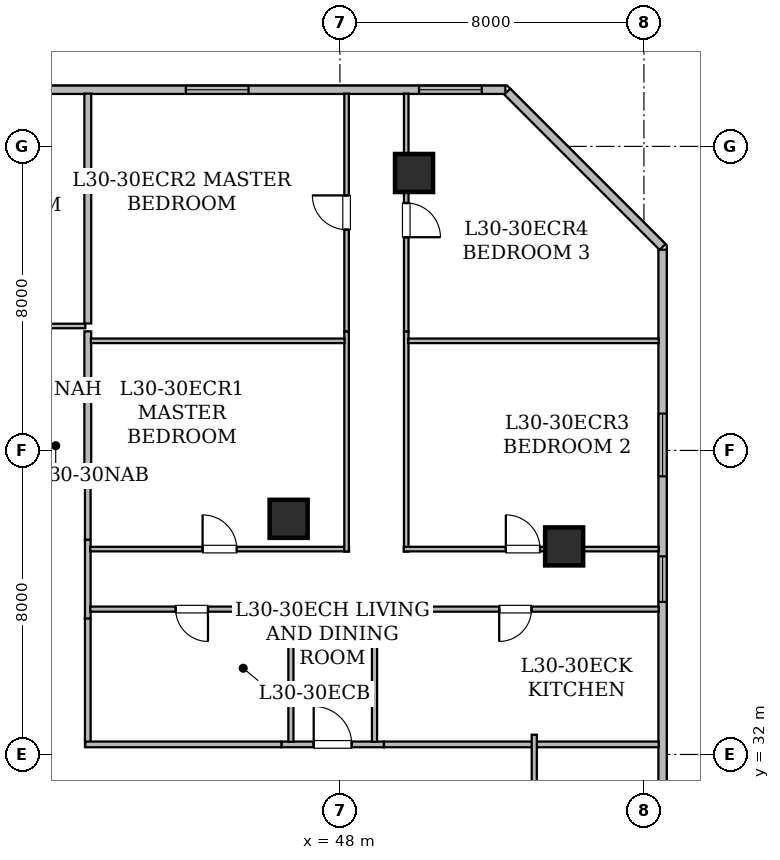
"""IFC4 building model, lengths in metres.
Left out: names, types, materials, properties, quantities, classifications, styles, units other than length and angle.
Written with IfcOpenShell. Run it as: python <this file> out.ifc"""

import sys

from ifc_helpers import new_model, si_unit, direction, frame, frame_2d, origin, origin_2d, place, context, subcontext, project, spatial, rectangle, hollow_rectangle, extrude, element, fill, save


model = new_model("IFC4")
c1 = context("Model", 3, precision=1e-05, world=origin(), true_north=direction((0.0, 1.0)))
c2 = subcontext(c1, "Body", "Model", "MODEL_VIEW")
j1 = project(units=[si_unit("LENGTHUNIT", "METRE"), si_unit("PLANEANGLEUNIT", "RADIAN")], contexts=[c1])
p1 = place(None, origin())
s1 = spatial("IfcSite", under=j1, at=p1, CompositionType="ELEMENT")
p2 = place(p1, origin())
s2 = spatial("IfcBuilding", under=s1, at=p2, CompositionType="ELEMENT")
p3 = place(p2, frame((0.0, 0.0, 120.15)))
s3 = spatial("IfcBuildingStorey", under=s2, at=p3, CompositionType="ELEMENT", Elevation=120.15)
for number, where, z_axis, x_axis in (
    (1, (49.95, 47.3, 0.0), (0.0, 0.0, 1.0), (1.0, 0.0, 0.0)),
    (2, (53.9, 37.475, 0.0), (0.0, 0.0, 1.0), (1.0, 0.0, 0.0)),
    (3, (46.65, 38.2, 0.0), (0.0, 0.0, 1.0), (1.0, 0.0, 0.0)),
):
    element("IfcColumn", number, at=place(p3, frame(where, z_axis=z_axis, x_axis=x_axis)), inside=s3, PredefinedType="COLUMN", context=c2, shape_type="SweptSolid", body=[
        extrude(hollow_rectangle(XDim=1.0, YDim=1.0, WallThickness=0.05, at=origin_2d()), origin(), (0.0, 0.0, 1.0), 3.65),
    ])
p4 = place(p3, frame((13.715, 49.49, 0.0), z_axis=(0.0, 0.0, 1.0), x_axis=(1.0, 0.0, 0.0)))
e4 = element("IfcWall", 4, at=p4, inside=s3, PredefinedType="STANDARD", context=c2, shape_type="SweptSolid", body=[
    extrude(rectangle(XDim=38.639, YDim=0.22, at=frame_2d((19.319, 0.0))), origin(), (0.0, 0.0, 1.0), 3.43),
])
p5 = place(p4, frame((16.16, 0.0, 0.85)))
e5 = element("IfcOpeningElement", 5, at=p5, cuts=e4, PredefinedType="OPENING", context=c2, shape_type="SweptSolid", body=[
    extrude(rectangle(XDim=1.65, YDim=1.55, at=frame_2d((0.825, 0.775))), frame((0.0, 0.12, 0.0), z_axis=(0.0, -1.0, 0.0), x_axis=(1.0, 0.0, 0.0)), (0.0, 0.0, 1.0), 0.24),
])
p6 = place(p4, frame((2.243, 0.0, 0.85)))
e6 = element("IfcOpeningElement", 6, at=p6, cuts=e4, PredefinedType="OPENING", context=c2, shape_type="SweptSolid", body=[
    extrude(rectangle(XDim=1.65, YDim=1.55, at=frame_2d((0.825, 0.775))), frame((0.0, 0.12, 0.0), z_axis=(0.0, -1.0, 0.0), x_axis=(1.0, 0.0, 0.0)), (0.0, 0.0, 1.0), 0.24),
])
p7 = place(p4, frame((11.03, 0.0, 0.85)))
e7 = element("IfcOpeningElement", 7, at=p7, cuts=e4, PredefinedType="OPENING", context=c2, shape_type="SweptSolid", body=[
    extrude(rectangle(XDim=1.65, YDim=1.55, at=frame_2d((0.825, 0.775))), frame((0.0, 0.12, 0.0), z_axis=(0.0, -1.0, 0.0), x_axis=(1.0, 0.0, 0.0)), (0.0, 0.0, 1.0), 0.24),
])
p8 = place(p4, frame((9.2, 0.0, 0.8)))
e8 = element("IfcOpeningElement", 8, at=p8, cuts=e4, PredefinedType="OPENING", context=c2, shape_type="SweptSolid", body=[
    extrude(rectangle(XDim=1.2, YDim=1.5, at=frame_2d((0.6, 0.75))), frame((0.0, 0.12, 0.0), z_axis=(0.0, -1.0, 0.0), x_axis=(1.0, 0.0, 0.0)), (0.0, 0.0, 1.0), 0.24),
])
p9 = place(p4, frame((6.175, 0.0, 0.85)))
e9 = element("IfcOpeningElement", 9, at=p9, cuts=e4, PredefinedType="OPENING", context=c2, shape_type="SweptSolid", body=[
    extrude(rectangle(XDim=1.65, YDim=1.55, at=frame_2d((0.825, 0.775))), frame((0.0, 0.12, 0.0), z_axis=(0.0, -1.0, 0.0), x_axis=(1.0, 0.0, 0.0)), (0.0, 0.0, 1.0), 0.24),
])
p10 = place(p4, frame((23.425, 0.0, 0.85)))
e10 = element("IfcOpeningElement", 10, at=p10, cuts=e4, PredefinedType="OPENING", context=c2, shape_type="SweptSolid", body=[
    extrude(rectangle(XDim=1.65, YDim=1.55, at=frame_2d((0.825, 0.775))), frame((0.0, 0.12, 0.0), z_axis=(0.0, -1.0, 0.0), x_axis=(1.0, 0.0, 0.0)), (0.0, 0.0, 1.0), 0.24),
])
p11 = place(p4, frame((30.23, 0.0, 0.85)))
e11 = element("IfcOpeningElement", 11, at=p11, cuts=e4, PredefinedType="OPENING", context=c2, shape_type="SweptSolid", body=[
    extrude(rectangle(XDim=1.65, YDim=1.55, at=frame_2d((0.825, 0.775))), frame((0.0, 0.12, 0.0), z_axis=(0.0, -1.0, 0.0), x_axis=(1.0, 0.0, 0.0)), (0.0, 0.0, 1.0), 0.24),
])
p12 = place(p4, frame((36.367, 0.0, 0.85)))
e12 = element("IfcOpeningElement", 12, at=p12, cuts=e4, PredefinedType="OPENING", context=c2, shape_type="SweptSolid", body=[
    extrude(rectangle(XDim=1.65, YDim=1.55, at=frame_2d((0.825, 0.775))), frame((0.0, 0.12, 0.0), z_axis=(0.0, -1.0, 0.0), x_axis=(1.0, 0.0, 0.0)), (0.0, 0.0, 1.0), 0.24),
])
p13 = place(p3, frame((52.402, 49.442, 0.0), z_axis=(0.0, 0.0, 1.0), x_axis=(0.707106781187, -0.707106781187, 0.0)))
e13 = element("IfcWall", 13, at=p13, inside=s3, PredefinedType="STANDARD", context=c2, shape_type="SweptSolid", body=[
    extrude(rectangle(XDim=5.781, YDim=0.22, at=frame_2d((2.891, 0.0))), origin(), (0.0, 0.0, 1.0), 3.43),
])
p14 = place(p3, frame((56.49, 45.283, 0.0), z_axis=(0.0, 0.0, 1.0), x_axis=(0.0, -1.0, 0.0)))
e14 = element("IfcWall", 14, at=p14, inside=s3, PredefinedType="STANDARD", context=c2, shape_type="SweptSolid", body=[
    extrude(rectangle(XDim=14.046, YDim=0.22, at=frame_2d((7.023, 0.0))), origin(), (0.0, 0.0, 1.0), 3.43),
])
p15 = place(p14, frame((8.069, 0.0, 0.8)))
e15 = element("IfcOpeningElement", 15, at=p15, cuts=e14, PredefinedType="OPENING", context=c2, shape_type="SweptSolid", body=[
    extrude(rectangle(XDim=1.2, YDim=1.5, at=frame_2d((0.6, 0.75))), frame((0.0, 0.12, 0.0), z_axis=(0.0, -1.0, 0.0), x_axis=(1.0, 0.0, 0.0)), (0.0, 0.0, 1.0), 0.24),
])
p16 = place(p14, frame((4.314, 0.0, 0.85)))
e16 = element("IfcOpeningElement", 16, at=p16, cuts=e14, PredefinedType="OPENING", context=c2, shape_type="SweptSolid", body=[
    extrude(rectangle(XDim=1.65, YDim=1.55, at=frame_2d((0.825, 0.775))), frame((0.0, 0.12, 0.0), z_axis=(0.0, -1.0, 0.0), x_axis=(1.0, 0.0, 0.0)), (0.0, 0.0, 1.0), 0.24),
])
p17 = place(p3, frame((39.314, 39.165, 0.0), z_axis=(0.0, 0.0, 1.0), x_axis=(1.0, 0.0, 0.0)))
e17 = element("IfcWall", 17, at=p17, inside=s3, PredefinedType="STANDARD", context=c2, shape_type="SweptSolid", body=[
    extrude(rectangle(XDim=1.986, YDim=0.15, at=frame_2d((0.993, 0.0))), origin(), (0.0, 0.0, 1.0), 2.647),
])
p18 = place(p3, frame((41.365, 37.653, 0.0), z_axis=(0.0, 0.0, 1.0), x_axis=(0.0, -1.0, 0.0)))
e18 = element("IfcWall", 18, at=p18, inside=s3, PredefinedType="STANDARD", context=c2, shape_type="SweptSolid", body=[
    extrude(rectangle(XDim=2.078, YDim=0.15, at=frame_2d((1.039, 0.0))), origin(), (0.0, 0.0, 1.0), 2.647),
])
p19 = place(p3, frame((46.461, 32.265, 0.0), z_axis=(0.0, 0.0, 1.0), x_axis=(1.0, 0.0, 0.0)))
e19 = element("IfcWall", 19, at=p19, inside=s3, PredefinedType="STANDARD", context=c2, shape_type="SweptSolid", body=[
    extrude(rectangle(XDim=2.698, YDim=0.15, at=frame_2d((1.349, 0.0))), origin(), (0.0, 0.0, 1.0), 2.647),
])
p20 = place(p19, frame((0.849, 0.0, 0.0)))
e20 = element("IfcOpeningElement", 20, at=p20, cuts=e19, PredefinedType="OPENING", context=c2, shape_type="SweptSolid", body=[
    extrude(rectangle(XDim=1.0, YDim=2.15, at=frame_2d((0.5, 1.075))), frame((0.0, 0.085, 0.0), z_axis=(0.0, -1.0, 0.0), x_axis=(1.0, 0.0, 0.0)), (0.0, 0.0, 1.0), 0.17),
])
p21 = place(p3, frame((41.365, 35.575, 0.0), z_axis=(0.0, 0.0, 1.0), x_axis=(0.0, -1.0, 0.0)))
e21 = element("IfcWall", 21, at=p21, inside=s3, PredefinedType="STANDARD", context=c2, shape_type="SweptSolid", body=[
    extrude(rectangle(XDim=3.375, YDim=0.15, at=frame_2d((1.688, 0.0))), origin(), (0.0, 0.0, 1.0), 3.43),
])
p22 = place(p3, frame((41.3, 32.265, 0.0), z_axis=(0.0, 0.0, 1.0), x_axis=(1.0, 0.0, 0.0)))
e22 = element("IfcWall", 22, at=p22, inside=s3, PredefinedType="STANDARD", context=c2, shape_type="SweptSolid", body=[
    extrude(rectangle(XDim=5.161, YDim=0.15, at=frame_2d((2.581, 0.0))), origin(), (0.0, 0.0, 1.0), 2.647),
])
p23 = place(p3, frame((49.159, 32.265, 0.0), z_axis=(0.0, 0.0, 1.0), x_axis=(1.0, 0.0, 0.0)))
e23 = element("IfcWall", 23, at=p23, inside=s3, PredefinedType="STANDARD", context=c2, shape_type="SweptSolid", body=[
    extrude(rectangle(XDim=7.229, YDim=0.15, at=frame_2d((3.615, 0.0))), origin(), (0.0, 0.0, 1.0), 2.876),
])
p24 = place(p3, frame((41.365, 39.1, 0.0), z_axis=(0.0, 0.0, 1.0), x_axis=(0.0, -1.0, 0.0)))
e24 = element("IfcWall", 24, at=p24, inside=s3, PredefinedType="STANDARD", context=c2, shape_type="SweptSolid", body=[
    extrude(rectangle(XDim=1.447, YDim=0.15, at=frame_2d((0.724, 0.0))), origin(), (0.0, 0.0, 1.0), 3.43),
])
p25 = place(p3, frame((41.3, 41.695, 0.0), z_axis=(0.0, 0.0, 1.0), x_axis=(-1.0, 0.0, 0.0)))
e25 = element("IfcWall", 25, at=p25, inside=s3, PredefinedType="PARTITIONING", context=c2, shape_type="SweptSolid", body=[
    extrude(rectangle(XDim=2.3, YDim=0.135, at=frame_2d((1.15, 0.0))), origin(), (0.0, 0.0, 1.0), 2.647),
])
p26 = place(p3, frame((34.619, 43.275, 0.0), z_axis=(0.0, 0.0, 1.0), x_axis=(1.0, 0.0, 0.0)))
e26 = element("IfcWall", 26, at=p26, inside=s3, PredefinedType="PARTITIONING", context=c2, shape_type="SweptSolid", body=[
    extrude(rectangle(XDim=6.681, YDim=0.12, at=frame_2d((3.341, 0.0))), origin(), (0.0, 0.0, 1.0), 2.647),
])
p27 = place(p26, frame((2.89, 0.0, 0.0)))
e27 = element("IfcOpeningElement", 27, at=p27, cuts=e26, PredefinedType="OPENING", context=c2, shape_type="SweptSolid", body=[
    extrude(rectangle(XDim=0.9, YDim=2.1, at=frame_2d((0.45, 1.05))), frame((0.0, 0.07, 0.0), z_axis=(0.0, -1.0, 0.0), x_axis=(1.0, 0.0, 0.0)), (0.0, 0.0, 1.0), 0.14),
])
p28 = place(p3, frame((41.365, 43.133, 0.0), z_axis=(0.0, 0.0, 1.0), x_axis=(0.0, -1.0, 0.0)))
e28 = element("IfcWall", 28, at=p28, inside=s3, PredefinedType="STANDARD", context=c2, shape_type="SweptSolid", body=[
    extrude(rectangle(XDim=1.373, YDim=0.18, at=frame_2d((0.687, 0.0))), origin(), (0.0, 0.0, 1.0), 3.43),
])
p29 = place(p3, frame((41.365, 41.63, 0.0), z_axis=(0.0, 0.0, 1.0), x_axis=(0.0, -1.0, 0.0)))
e29 = element("IfcWall", 29, at=p29, inside=s3, PredefinedType="STANDARD", context=c2, shape_type="SweptSolid", body=[
    extrude(rectangle(XDim=2.4, YDim=0.18, at=frame_2d((1.2, 0.0))), origin(), (0.0, 0.0, 1.0), 3.43),
])
p30 = place(p3, frame((41.365, 49.388, 0.0), z_axis=(0.0, 0.0, 1.0), x_axis=(0.0, -1.0, 0.0)))
e30 = element("IfcWall", 30, at=p30, inside=s3, PredefinedType="STANDARD", context=c2, shape_type="SweptSolid", body=[
    extrude(rectangle(XDim=6.048, YDim=0.18, at=frame_2d((3.024, 0.0))), origin(), (0.0, 0.0, 1.0), 2.876),
])
p31 = place(p3, frame((53.114, 32.52, 0.0), z_axis=(0.0, 0.0, 1.0), x_axis=(0.0, -1.0, 0.0)))
e31 = element("IfcWall", 31, at=p31, inside=s3, PredefinedType="PARTITIONING", context=c2, shape_type="SweptSolid", body=[
    extrude(rectangle(XDim=8.78, YDim=0.135, at=frame_2d((4.39, 0.0))), origin(), (0.0, 0.0, 1.0), 3.43),
])
p32 = place(p3, frame((46.71, 32.332, 0.0), z_axis=(0.0, 0.0, 1.0), x_axis=(0.0, 1.0, 0.0)))
e32 = element("IfcWall", 32, at=p32, inside=s3, PredefinedType="PARTITIONING", context=c2, shape_type="SweptSolid", body=[
    extrude(rectangle(XDim=3.557, YDim=0.135, at=frame_2d((1.778, 0.0))), origin(), (0.0, 0.0, 1.0), 2.647),
])
p33 = place(p3, frame((46.775, 35.824, 0.0), z_axis=(0.0, 0.0, 1.0), x_axis=(-1.0, 0.0, 0.0)))
e33 = element("IfcWall", 33, at=p33, inside=s3, PredefinedType="PARTITIONING", context=c2, shape_type="SweptSolid", body=[
    extrude(rectangle(XDim=5.343, YDim=0.135, at=frame_2d((2.671, 0.0))), origin(), (0.0, 0.0, 1.0), 2.647),
])
p34 = place(p33, frame((2.247, 0.0, 0.0)))
e34 = element("IfcOpeningElement", 34, at=p34, cuts=e33, PredefinedType="OPENING", context=c2, shape_type="SweptSolid", body=[
    extrude(rectangle(XDim=0.85, YDim=2.1, at=frame_2d((0.425, 1.05))), frame((0.0, 0.077, 0.0), z_axis=(0.0, -1.0, 0.0), x_axis=(1.0, 0.0, 0.0)), (0.0, 0.0, 1.0), 0.155),
])
p35 = place(p3, frame((56.388, 35.824, 0.0), z_axis=(0.0, 0.0, 1.0), x_axis=(-1.0, 0.0, 0.0)))
e35 = element("IfcWall", 35, at=p35, inside=s3, PredefinedType="PARTITIONING", context=c2, shape_type="SweptSolid", body=[
    extrude(rectangle(XDim=7.543, YDim=0.135, at=frame_2d((3.771, 0.0))), origin(), (0.0, 0.0, 1.0), 2.876),
])
p36 = place(p35, frame((3.347, 0.0, 0.0)))
e36 = element("IfcOpeningElement", 36, at=p36, cuts=e35, PredefinedType="OPENING", context=c2, shape_type="SweptSolid", body=[
    extrude(rectangle(XDim=0.85, YDim=2.1, at=frame_2d((0.425, 1.05))), frame((0.0, 0.077, 0.0), z_axis=(0.0, -1.0, 0.0), x_axis=(1.0, 0.0, 0.0)), (0.0, 0.0, 1.0), 0.155),
])
p37 = place(p3, frame((48.91, 35.889, 0.0), z_axis=(0.0, 0.0, 1.0), x_axis=(0.0, -1.0, 0.0)))
e37 = element("IfcWall", 37, at=p37, inside=s3, PredefinedType="PARTITIONING", context=c2, shape_type="SweptSolid", body=[
    extrude(rectangle(XDim=3.557, YDim=0.135, at=frame_2d((1.778, 0.0))), origin(), (0.0, 0.0, 1.0), 3.43),
])
p38 = place(p3, frame((41.432, 37.404, 0.0), z_axis=(0.0, 0.0, 1.0), x_axis=(1.0, 0.0, 0.0)))
e38 = element("IfcWall", 38, at=p38, inside=s3, PredefinedType="PARTITIONING", context=c2, shape_type="SweptSolid", body=[
    extrude(rectangle(XDim=6.808, YDim=0.12, at=frame_2d((3.404, 0.0))), origin(), (0.0, 0.0, 1.0), 2.647),
])
p39 = place(p38, frame((2.954, 0.0, 0.0)))
e39 = element("IfcOpeningElement", 39, at=p39, cuts=e38, PredefinedType="OPENING", context=c2, shape_type="SweptSolid", body=[
    extrude(rectangle(XDim=0.9, YDim=2.1, at=frame_2d((0.45, 1.05))), frame((0.0, 0.07, 0.0), z_axis=(0.0, -1.0, 0.0), x_axis=(1.0, 0.0, 0.0)), (0.0, 0.0, 1.0), 0.14),
])
p40 = place(p3, frame((48.175, 37.339, 0.0), z_axis=(0.0, 0.0, 1.0), x_axis=(0.0, 1.0, 0.0)))
e40 = element("IfcWall", 40, at=p40, inside=s3, PredefinedType="PARTITIONING", context=c2, shape_type="SweptSolid", body=[
    extrude(rectangle(XDim=5.794, YDim=0.12, at=frame_2d((2.897, 0.0))), origin(), (0.0, 0.0, 1.0), 2.647),
])
p41 = place(p3, frame((48.175, 43.133, 0.0), z_axis=(0.0, 0.0, 1.0), x_axis=(0.0, 1.0, 0.0)))
e41 = element("IfcWall", 41, at=p41, inside=s3, PredefinedType="PARTITIONING", context=c2, shape_type="SweptSolid", body=[
    extrude(rectangle(XDim=6.255, YDim=0.12, at=frame_2d((3.127, 0.0))), origin(), (0.0, 0.0, 1.0), 2.647),
])
p42 = place(p41, frame((2.677, 0.0, 0.0)))
e42 = element("IfcOpeningElement", 42, at=p42, cuts=e41, PredefinedType="OPENING", context=c2, shape_type="SweptSolid", body=[
    extrude(rectangle(XDim=0.9, YDim=2.1, at=frame_2d((0.45, 1.05))), frame((0.0, 0.07, 0.0), z_axis=(0.0, -1.0, 0.0), x_axis=(1.0, 0.0, 0.0)), (0.0, 0.0, 1.0), 0.14),
])
p43 = place(p3, frame((49.745, 43.133, 0.0), z_axis=(0.0, 0.0, 1.0), x_axis=(0.0, -1.0, 0.0)))
e43 = element("IfcWall", 43, at=p43, inside=s3, PredefinedType="PARTITIONING", context=c2, shape_type="SweptSolid", body=[
    extrude(rectangle(XDim=5.794, YDim=0.12, at=frame_2d((2.897, 0.0))), origin(), (0.0, 0.0, 1.0), 2.647),
])
p44 = place(p3, frame((49.68, 37.404, 0.0), z_axis=(0.0, 0.0, 1.0), x_axis=(1.0, 0.0, 0.0)))
e44 = element("IfcWall", 44, at=p44, inside=s3, PredefinedType="PARTITIONING", context=c2, shape_type="SweptSolid", body=[
    extrude(rectangle(XDim=6.708, YDim=0.12, at=frame_2d((3.354, 0.0))), origin(), (0.0, 0.0, 1.0), 2.647),
])
p45 = place(p44, frame((2.686, 0.0, 0.0)))
e45 = element("IfcOpeningElement", 45, at=p45, cuts=e44, PredefinedType="OPENING", context=c2, shape_type="SweptSolid", body=[
    extrude(rectangle(XDim=0.9, YDim=2.1, at=frame_2d((0.45, 1.05))), frame((0.0, 0.07, 0.0), z_axis=(0.0, -1.0, 0.0), x_axis=(1.0, 0.0, 0.0)), (0.0, 0.0, 1.0), 0.14),
])
p46 = place(p3, frame((49.745, 49.388, 0.0), z_axis=(0.0, 0.0, 1.0), x_axis=(0.0, -1.0, 0.0)))
e46 = element("IfcWall", 46, at=p46, inside=s3, PredefinedType="PARTITIONING", context=c2, shape_type="SweptSolid", body=[
    extrude(rectangle(XDim=6.255, YDim=0.12, at=frame_2d((3.127, 0.0))), origin(), (0.0, 0.0, 1.0), 2.647),
])
p47 = place(p46, frame((2.878, 0.0, 0.0)))
e47 = element("IfcOpeningElement", 47, at=p47, cuts=e46, PredefinedType="OPENING", context=c2, shape_type="SweptSolid", body=[
    extrude(rectangle(XDim=0.9, YDim=2.1, at=frame_2d((0.45, 1.05))), frame((0.0, 0.07, 0.0), z_axis=(0.0, -1.0, 0.0), x_axis=(1.0, 0.0, 0.0)), (0.0, 0.0, 1.0), 0.14),
])
p48 = place(p3, frame((41.447, 42.884, 0.0), z_axis=(0.0, 0.0, 1.0), x_axis=(1.0, 0.0, 0.0)))
e48 = element("IfcWall", 48, at=p48, inside=s3, PredefinedType="PARTITIONING", context=c2, shape_type="SweptSolid", body=[
    extrude(rectangle(XDim=6.674, YDim=0.12, at=frame_2d((3.337, 0.0))), origin(), (0.0, 0.0, 1.0), 3.43),
])
p49 = place(p3, frame((49.799, 42.884, 0.0), z_axis=(0.0, 0.0, 1.0), x_axis=(1.0, 0.0, 0.0)))
e49 = element("IfcWall", 49, at=p49, inside=s3, PredefinedType="PARTITIONING", context=c2, shape_type="SweptSolid", body=[
    extrude(rectangle(XDim=6.589, YDim=0.12, at=frame_2d((3.294, 0.0))), origin(), (0.0, 0.0, 1.0), 2.876),
])
p50 = place(p15, origin())
e50 = element("IfcWindow", 50, at=p50, inside=s3, PartitioningType="SINGLE_PANEL", PredefinedType="WINDOW", context=c2, shape_type="SweptSolid", body=[
    extrude(rectangle(XDim=1.2, YDim=1.5, at=frame_2d((0.6, 0.75))), frame((0.0, 0.03, 0.0), z_axis=(0.0, -1.0, 0.0), x_axis=(1.0, 0.0, 0.0)), (0.0, 0.0, 1.0), 0.06),
])
fill(e15, e50)
p51 = place(p11, origin())
e51 = element("IfcWindow", 51, at=p51, inside=s3, PartitioningType="SINGLE_PANEL", PredefinedType="WINDOW", context=c2, shape_type="SweptSolid", body=[
    extrude(rectangle(XDim=1.65, YDim=1.55, at=frame_2d((0.825, 0.775))), frame((0.0, 0.03, 0.0), z_axis=(0.0, -1.0, 0.0), x_axis=(1.0, 0.0, 0.0)), (0.0, 0.0, 1.0), 0.06),
])
fill(e11, e51)
p52 = place(p16, origin())
e52 = element("IfcWindow", 52, at=p52, inside=s3, PartitioningType="SINGLE_PANEL", PredefinedType="WINDOW", context=c2, shape_type="SweptSolid", body=[
    extrude(rectangle(XDim=1.65, YDim=1.55, at=frame_2d((0.825, 0.775))), frame((0.0, 0.03, 0.0), z_axis=(0.0, -1.0, 0.0), x_axis=(1.0, 0.0, 0.0)), (0.0, 0.0, 1.0), 0.06),
])
fill(e16, e52)
p53 = place(p12, origin())
e53 = element("IfcWindow", 53, at=p53, inside=s3, PartitioningType="SINGLE_PANEL", PredefinedType="WINDOW", context=c2, shape_type="SweptSolid", body=[
    extrude(rectangle(XDim=1.65, YDim=1.55, at=frame_2d((0.825, 0.775))), frame((0.0, 0.03, 0.0), z_axis=(0.0, -1.0, 0.0), x_axis=(1.0, 0.0, 0.0)), (0.0, 0.0, 1.0), 0.06),
])
fill(e12, e53)
p54 = place(p20, origin())
e54 = element("IfcDoor", 54, at=p54, inside=s3, OperationType="SINGLE_SWING_LEFT", PredefinedType="DOOR", context=c2, shape_type="SweptSolid", body=[
    extrude(rectangle(XDim=1.0, YDim=2.15, at=frame_2d((0.5, 1.075))), frame((0.0, 0.025, 0.0), z_axis=(0.0, -1.0, 0.0), x_axis=(1.0, 0.0, 0.0)), (0.0, 0.0, 1.0), 0.05),
])
fill(e20, e54)
p55 = place(p34, origin())
e55 = element("IfcDoor", 55, at=p55, inside=s3, OperationType="SINGLE_SWING_LEFT", PredefinedType="DOOR", context=c2, shape_type="SweptSolid", body=[
    extrude(rectangle(XDim=0.85, YDim=2.1, at=frame_2d((0.425, 1.05))), frame((0.0, 0.025, 0.0), z_axis=(0.0, -1.0, 0.0), x_axis=(1.0, 0.0, 0.0)), (0.0, 0.0, 1.0), 0.05),
])
fill(e34, e55)
p56 = place(p36, origin())
e56 = element("IfcDoor", 56, at=p56, inside=s3, OperationType="SINGLE_SWING_RIGHT", PredefinedType="DOOR", context=c2, shape_type="SweptSolid", body=[
    extrude(rectangle(XDim=0.85, YDim=2.1, at=frame_2d((0.425, 1.05))), frame((0.0, 0.025, 0.0), z_axis=(0.0, -1.0, 0.0), x_axis=(1.0, 0.0, 0.0)), (0.0, 0.0, 1.0), 0.05),
])
fill(e36, e56)
p57 = place(p39, origin())
e57 = element("IfcDoor", 57, at=p57, inside=s3, OperationType="SINGLE_SWING_LEFT", PredefinedType="DOOR", context=c2, shape_type="SweptSolid", body=[
    extrude(rectangle(XDim=0.9, YDim=2.1, at=frame_2d((0.45, 1.05))), frame((0.0, 0.025, 0.0), z_axis=(0.0, -1.0, 0.0), x_axis=(1.0, 0.0, 0.0)), (0.0, 0.0, 1.0), 0.05),
])
fill(e39, e57)
p58 = place(p42, origin())
e58 = element("IfcDoor", 58, at=p58, inside=s3, OperationType="SINGLE_SWING_RIGHT", PredefinedType="DOOR", context=c2, shape_type="SweptSolid", body=[
    extrude(rectangle(XDim=0.9, YDim=2.1, at=frame_2d((0.45, 1.05))), frame((0.0, 0.025, 0.0), z_axis=(0.0, -1.0, 0.0), x_axis=(1.0, 0.0, 0.0)), (0.0, 0.0, 1.0), 0.05),
])
fill(e42, e58)
p59 = place(p45, origin())
e59 = element("IfcDoor", 59, at=p59, inside=s3, OperationType="SINGLE_SWING_LEFT", PredefinedType="DOOR", context=c2, shape_type="SweptSolid", body=[
    extrude(rectangle(XDim=0.9, YDim=2.1, at=frame_2d((0.45, 1.05))), frame((0.0, 0.025, 0.0), z_axis=(0.0, -1.0, 0.0), x_axis=(1.0, 0.0, 0.0)), (0.0, 0.0, 1.0), 0.05),
])
fill(e45, e59)
p60 = place(p47, origin())
e60 = element("IfcDoor", 60, at=p60, inside=s3, OperationType="SINGLE_SWING_RIGHT", PredefinedType="DOOR", context=c2, shape_type="SweptSolid", body=[
    extrude(rectangle(XDim=0.9, YDim=2.1, at=frame_2d((0.45, 1.05))), frame((0.0, 0.025, 0.0), z_axis=(0.0, -1.0, 0.0), x_axis=(1.0, 0.0, 0.0)), (0.0, 0.0, 1.0), 0.05),
])
fill(e47, e60)
save(model, sys.argv[1])
